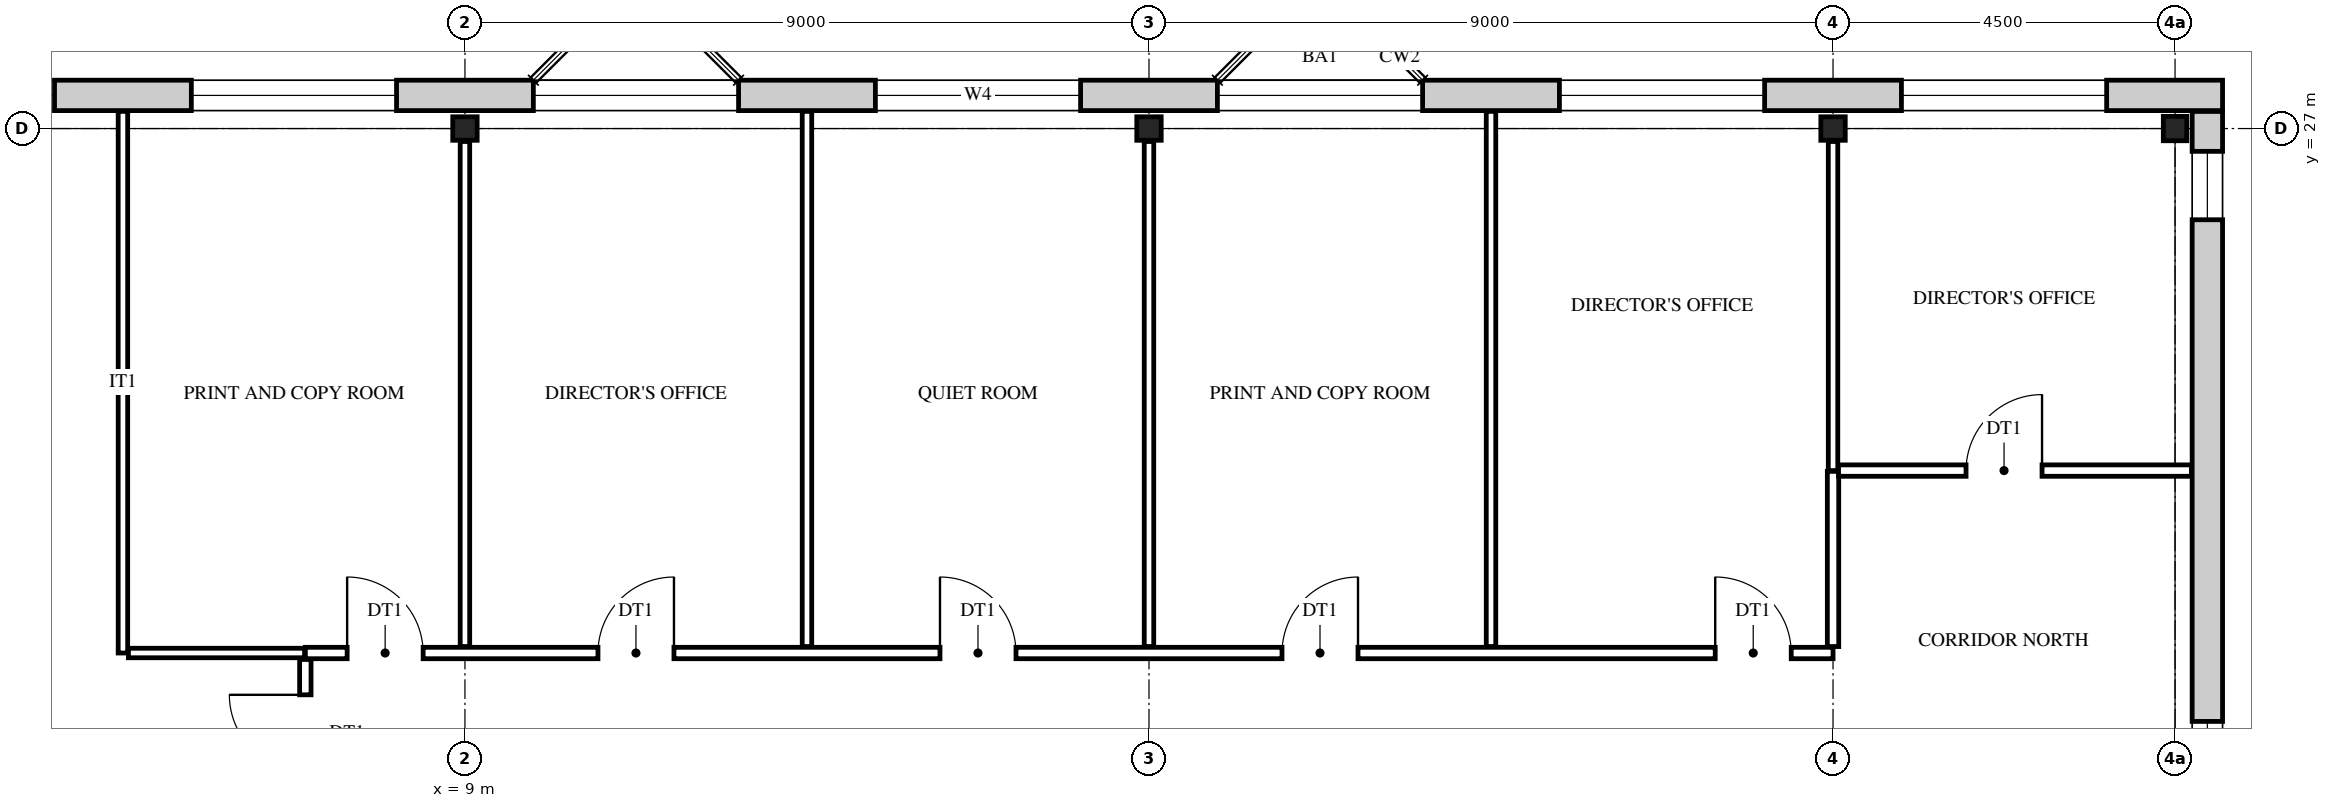
"""IFC4 building model, lengths in metres.
Left out: names, types, materials, properties, quantities, classifications, styles, units other than length and angle.
Written with IfcOpenShell. Run it as: python <this file> out.ifc"""

import sys

from ifc_helpers import new_model, si_unit, direction, frame, frame_2d, origin, origin_2d, place, context, subcontext, project, spatial, rectangle, i_section, extrude, element, fill, save


model = new_model("IFC4")
c1 = context("Model", 3, precision=1e-05, world=origin(), true_north=direction((0.0, 1.0)))
c2 = subcontext(c1, "Body", "Model", "MODEL_VIEW")
j1 = project(units=[si_unit("LENGTHUNIT", "METRE"), si_unit("PLANEANGLEUNIT", "RADIAN")], contexts=[c1])
p1 = place(None, origin())
s1 = spatial("IfcSite", under=j1, at=p1, CompositionType="ELEMENT")
p2 = place(p1, origin())
s2 = spatial("IfcBuilding", under=s1, at=p2, CompositionType="ELEMENT")
p3 = place(p2, frame((0.0, 0.0, 52.8)))
s3 = spatial("IfcBuildingStorey", under=s2, at=p3, CompositionType="ELEMENT", Elevation=52.8)
for number, where, z_axis, x_axis in (
    (1, (9.0, 27.0, 0.0), (0.0, 0.0, 1.0), (0.0, 1.0, 0.0)),
    (2, (18.0, 27.0, 0.0), (0.0, 0.0, 1.0), (0.0, 1.0, 0.0)),
    (3, (27.0, 27.0, 0.0), (0.0, 0.0, 1.0), (0.0, 1.0, 0.0)),
    (4, (31.5, 27.0, 0.0), (0.0, 0.0, 1.0), (1.0, 0.0, 0.0)),
):
    element("IfcColumn", number, at=place(p3, frame(where, z_axis=z_axis, x_axis=x_axis)), inside=s3, PredefinedType="COLUMN", context=c2, shape_type="SweptSolid", body=[
        extrude(i_section(OverallWidth=0.309, OverallDepth=0.321, WebThickness=0.014, FlangeThickness=0.022, FilletRadius=0.017, at=origin_2d()), origin(), (0.0, 0.0, 1.0), 4.2),
    ])
p4 = place(p3, frame((-0.625, 27.436, 0.0), z_axis=(0.0, 0.0, 1.0), x_axis=(1.0, 0.0, 0.0)))
e5 = element("IfcWall", 5, at=p4, inside=s3, PredefinedType="STANDARD", context=c2, shape_type="SweptSolid", body=[
    extrude(rectangle(XDim=32.75, YDim=0.4, at=frame_2d((16.375, 0.0))), origin(), (0.0, 0.0, 1.0), 4.2),
])
p5 = place(p4, frame((1.525, 0.0, 0.9)))
e6 = element("IfcOpeningElement", 6, at=p5, cuts=e5, PredefinedType="OPENING", context=c2, shape_type="SweptSolid", body=[
    extrude(rectangle(XDim=2.7, YDim=2.5, at=frame_2d((1.35, 1.25))), frame((0.0, 0.21, 0.0), z_axis=(0.0, -1.0, 0.0), x_axis=(1.0, 0.0, 0.0)), (0.0, 0.0, 1.0), 0.42),
])
p6 = place(p4, frame((6.025, 0.0, 0.9)))
e7 = element("IfcOpeningElement", 7, at=p6, cuts=e5, PredefinedType="OPENING", context=c2, shape_type="SweptSolid", body=[
    extrude(rectangle(XDim=2.7, YDim=2.5, at=frame_2d((1.35, 1.25))), frame((0.0, 0.21, 0.0), z_axis=(0.0, -1.0, 0.0), x_axis=(1.0, 0.0, 0.0)), (0.0, 0.0, 1.0), 0.42),
])
p7 = place(p4, frame((10.525, 0.0, 0.9)))
e8 = element("IfcOpeningElement", 8, at=p7, cuts=e5, PredefinedType="OPENING", context=c2, shape_type="SweptSolid", body=[
    extrude(rectangle(XDim=2.7, YDim=2.5, at=frame_2d((1.35, 1.25))), frame((0.0, 0.21, 0.0), z_axis=(0.0, -1.0, 0.0), x_axis=(1.0, 0.0, 0.0)), (0.0, 0.0, 1.0), 0.42),
])
p8 = place(p4, frame((15.025, 0.0, 0.9)))
e9 = element("IfcOpeningElement", 9, at=p8, cuts=e5, PredefinedType="OPENING", context=c2, shape_type="SweptSolid", body=[
    extrude(rectangle(XDim=2.7, YDim=2.5, at=frame_2d((1.35, 1.25))), frame((0.0, 0.21, 0.0), z_axis=(0.0, -1.0, 0.0), x_axis=(1.0, 0.0, 0.0)), (0.0, 0.0, 1.0), 0.42),
])
p9 = place(p4, frame((19.525, 0.0, 0.9)))
e10 = element("IfcOpeningElement", 10, at=p9, cuts=e5, PredefinedType="OPENING", context=c2, shape_type="SweptSolid", body=[
    extrude(rectangle(XDim=2.7, YDim=2.5, at=frame_2d((1.35, 1.25))), frame((0.0, 0.21, 0.0), z_axis=(0.0, -1.0, 0.0), x_axis=(1.0, 0.0, 0.0)), (0.0, 0.0, 1.0), 0.42),
])
p10 = place(p4, frame((24.025, 0.0, 0.9)))
e11 = element("IfcOpeningElement", 11, at=p10, cuts=e5, PredefinedType="OPENING", context=c2, shape_type="SweptSolid", body=[
    extrude(rectangle(XDim=2.7, YDim=2.5, at=frame_2d((1.35, 1.25))), frame((0.0, 0.21, 0.0), z_axis=(0.0, -1.0, 0.0), x_axis=(1.0, 0.0, 0.0)), (0.0, 0.0, 1.0), 0.42),
])
p11 = place(p4, frame((28.525, 0.0, 0.9)))
e12 = element("IfcOpeningElement", 12, at=p11, cuts=e5, PredefinedType="OPENING", context=c2, shape_type="SweptSolid", body=[
    extrude(rectangle(XDim=2.7, YDim=2.5, at=frame_2d((1.35, 1.25))), frame((0.0, 0.21, 0.0), z_axis=(0.0, -1.0, 0.0), x_axis=(1.0, 0.0, 0.0)), (0.0, 0.0, 1.0), 0.42),
])
p12 = place(p3, frame((31.925, 27.225, 0.0), z_axis=(0.0, 0.0, 1.0), x_axis=(0.0, -1.0, 0.0)))
e13 = element("IfcWall", 13, at=p12, inside=s3, PredefinedType="STANDARD", context=c2, shape_type="SweptSolid", body=[
    extrude(rectangle(XDim=27.45, YDim=0.4, at=frame_2d((13.725, 0.0))), origin(), (0.0, 0.0, 1.0), 4.2),
])
p13 = place(p12, frame((26.025, 0.0, 0.9)))
e14 = element("IfcOpeningElement", 14, at=p13, cuts=e13, PredefinedType="OPENING", context=c2, shape_type="SweptSolid", body=[
    extrude(rectangle(XDim=0.9, YDim=2.0, at=frame_2d((0.45, 1.0))), frame((0.0, 0.21, 0.0), z_axis=(0.0, -1.0, 0.0), x_axis=(1.0, 0.0, 0.0)), (0.0, 0.0, 1.0), 0.42),
])
p14 = place(p12, frame((18.525, 0.0, 0.9)))
e15 = element("IfcOpeningElement", 15, at=p14, cuts=e13, PredefinedType="OPENING", context=c2, shape_type="SweptSolid", body=[
    extrude(rectangle(XDim=0.9, YDim=2.0, at=frame_2d((0.45, 1.0))), frame((0.0, 0.21, 0.0), z_axis=(0.0, -1.0, 0.0), x_axis=(1.0, 0.0, 0.0)), (0.0, 0.0, 1.0), 0.42),
])
p15 = place(p12, frame((15.675, 0.0, 1.6)))
e16 = element("IfcOpeningElement", 16, at=p15, cuts=e13, PredefinedType="OPENING", context=c2, shape_type="SweptSolid", body=[
    extrude(rectangle(XDim=0.6, YDim=0.9, at=frame_2d((0.3, 0.45))), frame((0.0, 0.21, 0.0), z_axis=(0.0, -1.0, 0.0), x_axis=(1.0, 0.0, 0.0)), (0.0, 0.0, 1.0), 0.42),
])
p16 = place(p12, frame((11.175, 0.0, 1.6)))
e17 = element("IfcOpeningElement", 17, at=p16, cuts=e13, PredefinedType="OPENING", context=c2, shape_type="SweptSolid", body=[
    extrude(rectangle(XDim=0.6, YDim=0.9, at=frame_2d((0.3, 0.45))), frame((0.0, 0.21, 0.0), z_axis=(0.0, -1.0, 0.0), x_axis=(1.0, 0.0, 0.0)), (0.0, 0.0, 1.0), 0.42),
])
p17 = place(p12, frame((8.025, 0.0, 0.9)))
e18 = element("IfcOpeningElement", 18, at=p17, cuts=e13, PredefinedType="OPENING", context=c2, shape_type="SweptSolid", body=[
    extrude(rectangle(XDim=0.9, YDim=2.0, at=frame_2d((0.45, 1.0))), frame((0.0, 0.21, 0.0), z_axis=(0.0, -1.0, 0.0), x_axis=(1.0, 0.0, 0.0)), (0.0, 0.0, 1.0), 0.42),
])
p18 = place(p12, frame((0.525, 0.0, 0.9)))
e19 = element("IfcOpeningElement", 19, at=p18, cuts=e13, PredefinedType="OPENING", context=c2, shape_type="SweptSolid", body=[
    extrude(rectangle(XDim=0.9, YDim=2.0, at=frame_2d((0.45, 1.0))), frame((0.0, 0.21, 0.0), z_axis=(0.0, -1.0, 0.0), x_axis=(1.0, 0.0, 0.0)), (0.0, 0.0, 1.0), 0.42),
])
p19 = place(p3, frame((4.5, 20.1, 0.0), z_axis=(0.0, 0.0, 1.0), x_axis=(0.0, 1.0, 0.0)))
e20 = element("IfcWall", 20, at=p19, inside=s3, PredefinedType="PARTITIONING", context=c2, shape_type="SweptSolid", body=[
    extrude(rectangle(XDim=7.126, YDim=0.125, at=frame_2d((3.563, 0.0))), origin(), (0.0, 0.0, 1.0), 3.542),
])
p20 = place(p3, frame((6.9, 6.985, 0.0), z_axis=(0.0, 0.0, 1.0), x_axis=(0.0, 1.0, 0.0)))
e21 = element("IfcWall", 21, at=p20, inside=s3, PredefinedType="PARTITIONING", context=c2, shape_type="SweptSolid", body=[
    extrude(rectangle(XDim=13.03, YDim=0.15, at=frame_2d((6.515, 0.0))), origin(), (0.0, 0.0, 1.0), 3.542),
])
p21 = place(p20, frame((11.565, 0.0, 0.0)))
e22 = element("IfcOpeningElement", 22, at=p21, cuts=e21, PredefinedType="OPENING", context=c2, shape_type="SweptSolid", body=[
    extrude(rectangle(XDim=1.0, YDim=2.1, at=frame_2d((0.5, 1.05))), frame((0.0, 0.085, 0.0), z_axis=(0.0, -1.0, 0.0), x_axis=(1.0, 0.0, 0.0)), (0.0, 0.0, 1.0), 0.17),
])
p22 = place(p20, frame((3.765, 0.0, 0.0)))
e23 = element("IfcOpeningElement", 23, at=p22, cuts=e21, PredefinedType="OPENING", context=c2, shape_type="SweptSolid", body=[
    extrude(rectangle(XDim=1.0, YDim=2.1, at=frame_2d((0.5, 1.05))), frame((0.0, 0.085, 0.0), z_axis=(0.0, -1.0, 0.0), x_axis=(1.0, 0.0, 0.0)), (0.0, 0.0, 1.0), 0.17),
])
p23 = place(p20, frame((8.265, 0.0, 0.0)))
e24 = element("IfcOpeningElement", 24, at=p23, cuts=e21, PredefinedType="OPENING", context=c2, shape_type="SweptSolid", body=[
    extrude(rectangle(XDim=1.0, YDim=2.1, at=frame_2d((0.5, 1.05))), frame((0.0, 0.085, 0.0), z_axis=(0.0, -1.0, 0.0), x_axis=(1.0, 0.0, 0.0)), (0.0, 0.0, 1.0), 0.17),
])
p24 = place(p3, frame((9.0, 20.185, 0.0), z_axis=(0.0, 0.0, 1.0), x_axis=(0.0, 1.0, 0.0)))
e25 = element("IfcWall", 25, at=p24, inside=s3, PredefinedType="PARTITIONING", context=c2, shape_type="SweptSolid", body=[
    extrude(rectangle(XDim=6.645, YDim=0.125, at=frame_2d((3.322, 0.0))), origin(), (0.0, 0.0, 1.0), 3.542),
])
p25 = place(p3, frame((13.5, 20.185, 0.0), z_axis=(0.0, 0.0, 1.0), x_axis=(0.0, 1.0, 0.0)))
e26 = element("IfcWall", 26, at=p25, inside=s3, PredefinedType="PARTITIONING", context=c2, shape_type="SweptSolid", body=[
    extrude(rectangle(XDim=7.041, YDim=0.125, at=frame_2d((3.521, 0.0))), origin(), (0.0, 0.0, 1.0), 3.542),
])
p26 = place(p3, frame((18.0, 20.185, 0.0), z_axis=(0.0, 0.0, 1.0), x_axis=(0.0, 1.0, 0.0)))
e27 = element("IfcWall", 27, at=p26, inside=s3, PredefinedType="PARTITIONING", context=c2, shape_type="SweptSolid", body=[
    extrude(rectangle(XDim=6.645, YDim=0.125, at=frame_2d((3.322, 0.0))), origin(), (0.0, 0.0, 1.0), 3.542),
])
p27 = place(p3, frame((22.5, 20.185, 0.0), z_axis=(0.0, 0.0, 1.0), x_axis=(0.0, 1.0, 0.0)))
e28 = element("IfcWall", 28, at=p27, inside=s3, PredefinedType="PARTITIONING", context=c2, shape_type="SweptSolid", body=[
    extrude(rectangle(XDim=7.041, YDim=0.125, at=frame_2d((3.521, 0.0))), origin(), (0.0, 0.0, 1.0), 3.542),
])
p28 = place(p3, frame((27.0, 20.185, 0.0), z_axis=(0.0, 0.0, 1.0), x_axis=(0.0, 1.0, 0.0)))
e29 = element("IfcWall", 29, at=p28, inside=s3, PredefinedType="PARTITIONING", context=c2, shape_type="SweptSolid", body=[
    extrude(rectangle(XDim=2.305, YDim=0.15, at=frame_2d((1.152, 0.0))), origin(), (0.0, 0.0, 1.0), 3.542),
])
p29 = place(p3, frame((27.0, 22.5, 0.0), z_axis=(0.0, 0.0, 1.0), x_axis=(0.0, 1.0, 0.0)))
e30 = element("IfcWall", 30, at=p29, inside=s3, PredefinedType="PARTITIONING", context=c2, shape_type="SweptSolid", body=[
    extrude(rectangle(XDim=4.33, YDim=0.125, at=frame_2d((2.165, 0.0))), origin(), (0.0, 0.0, 1.0), 3.542),
])
p30 = place(p3, frame((4.573, 20.1, 0.0), z_axis=(0.0, 0.0, 1.0), x_axis=(1.0, 0.0, 0.0)))
e31 = element("IfcWall", 31, at=p30, inside=s3, PredefinedType="PARTITIONING", context=c2, shape_type="SweptSolid", body=[
    extrude(rectangle(XDim=2.317, YDim=0.125, at=frame_2d((1.159, 0.0))), origin(), (0.0, 0.0, 1.0), 3.542),
])
p31 = place(p3, frame((6.9, 20.1, 0.0), z_axis=(0.0, 0.0, 1.0), x_axis=(1.0, 0.0, 0.0)))
e32 = element("IfcWall", 32, at=p31, inside=s3, PredefinedType="PARTITIONING", context=c2, shape_type="SweptSolid", body=[
    extrude(rectangle(XDim=20.1, YDim=0.15, at=frame_2d((10.05, 0.0))), origin(), (0.0, 0.0, 1.0), 3.542),
])
p32 = place(p31, frame((0.55, 0.0, 0.0)))
e33 = element("IfcOpeningElement", 33, at=p32, cuts=e32, PredefinedType="OPENING", context=c2, shape_type="SweptSolid", body=[
    extrude(rectangle(XDim=1.0, YDim=2.1, at=frame_2d((0.5, 1.05))), frame((0.0, 0.085, 0.0), z_axis=(0.0, -1.0, 0.0), x_axis=(1.0, 0.0, 0.0)), (0.0, 0.0, 1.0), 0.17),
])
p33 = place(p31, frame((3.85, 0.0, 0.0)))
e34 = element("IfcOpeningElement", 34, at=p33, cuts=e32, PredefinedType="OPENING", context=c2, shape_type="SweptSolid", body=[
    extrude(rectangle(XDim=1.0, YDim=2.1, at=frame_2d((0.5, 1.05))), frame((0.0, 0.085, 0.0), z_axis=(0.0, -1.0, 0.0), x_axis=(1.0, 0.0, 0.0)), (0.0, 0.0, 1.0), 0.17),
])
p34 = place(p31, frame((8.35, 0.0, 0.0)))
e35 = element("IfcOpeningElement", 35, at=p34, cuts=e32, PredefinedType="OPENING", context=c2, shape_type="SweptSolid", body=[
    extrude(rectangle(XDim=1.0, YDim=2.1, at=frame_2d((0.5, 1.05))), frame((0.0, 0.085, 0.0), z_axis=(0.0, -1.0, 0.0), x_axis=(1.0, 0.0, 0.0)), (0.0, 0.0, 1.0), 0.17),
])
p35 = place(p31, frame((12.85, 0.0, 0.0)))
e36 = element("IfcOpeningElement", 36, at=p35, cuts=e32, PredefinedType="OPENING", context=c2, shape_type="SweptSolid", body=[
    extrude(rectangle(XDim=1.0, YDim=2.1, at=frame_2d((0.5, 1.05))), frame((0.0, 0.085, 0.0), z_axis=(0.0, -1.0, 0.0), x_axis=(1.0, 0.0, 0.0)), (0.0, 0.0, 1.0), 0.17),
])
p36 = place(p31, frame((18.55, 0.0, 0.0)))
e37 = element("IfcOpeningElement", 37, at=p36, cuts=e32, PredefinedType="OPENING", context=c2, shape_type="SweptSolid", body=[
    extrude(rectangle(XDim=1.0, YDim=2.1, at=frame_2d((0.5, 1.05))), frame((0.0, 0.085, 0.0), z_axis=(0.0, -1.0, 0.0), x_axis=(1.0, 0.0, 0.0)), (0.0, 0.0, 1.0), 0.17),
])
p37 = place(p3, frame((27.073, 22.5, 0.0), z_axis=(0.0, 0.0, 1.0), x_axis=(1.0, 0.0, 0.0)))
e38 = element("IfcWall", 38, at=p37, inside=s3, PredefinedType="PARTITIONING", context=c2, shape_type="SweptSolid", body=[
    extrude(rectangle(XDim=4.643, YDim=0.15, at=frame_2d((2.321, 0.0))), origin(), (0.0, 0.0, 1.0), 3.542),
])
p38 = place(p37, frame((1.677, 0.0, 0.0)))
e39 = element("IfcOpeningElement", 39, at=p38, cuts=e38, PredefinedType="OPENING", context=c2, shape_type="SweptSolid", body=[
    extrude(rectangle(XDim=1.0, YDim=2.1, at=frame_2d((0.5, 1.05))), frame((0.0, 0.085, 0.0), z_axis=(0.0, -1.0, 0.0), x_axis=(1.0, 0.0, 0.0)), (0.0, 0.0, 1.0), 0.17),
])
p39 = place(p5, origin())
e40 = element("IfcWindow", 40, at=p39, inside=s3, PartitioningType="SINGLE_PANEL", PredefinedType="WINDOW", context=c2, shape_type="SweptSolid", body=[
    extrude(rectangle(XDim=2.7, YDim=2.5, at=frame_2d((1.35, 1.25))), frame((0.0, 0.03, 0.0), z_axis=(0.0, -1.0, 0.0), x_axis=(1.0, 0.0, 0.0)), (0.0, 0.0, 1.0), 0.06),
])
fill(e6, e40)
p40 = place(p6, origin())
e41 = element("IfcWindow", 41, at=p40, inside=s3, PartitioningType="SINGLE_PANEL", PredefinedType="WINDOW", context=c2, shape_type="SweptSolid", body=[
    extrude(rectangle(XDim=2.7, YDim=2.5, at=frame_2d((1.35, 1.25))), frame((0.0, 0.03, 0.0), z_axis=(0.0, -1.0, 0.0), x_axis=(1.0, 0.0, 0.0)), (0.0, 0.0, 1.0), 0.06),
])
fill(e7, e41)
p41 = place(p7, origin())
e42 = element("IfcWindow", 42, at=p41, inside=s3, PartitioningType="SINGLE_PANEL", PredefinedType="WINDOW", context=c2, shape_type="SweptSolid", body=[
    extrude(rectangle(XDim=2.7, YDim=2.5, at=frame_2d((1.35, 1.25))), frame((0.0, 0.03, 0.0), z_axis=(0.0, -1.0, 0.0), x_axis=(1.0, 0.0, 0.0)), (0.0, 0.0, 1.0), 0.06),
])
fill(e8, e42)
p42 = place(p8, origin())
e43 = element("IfcWindow", 43, at=p42, inside=s3, PartitioningType="SINGLE_PANEL", PredefinedType="WINDOW", context=c2, shape_type="SweptSolid", body=[
    extrude(rectangle(XDim=2.7, YDim=2.5, at=frame_2d((1.35, 1.25))), frame((0.0, 0.03, 0.0), z_axis=(0.0, -1.0, 0.0), x_axis=(1.0, 0.0, 0.0)), (0.0, 0.0, 1.0), 0.06),
])
fill(e9, e43)
p43 = place(p9, origin())
e44 = element("IfcWindow", 44, at=p43, inside=s3, PartitioningType="SINGLE_PANEL", PredefinedType="WINDOW", context=c2, shape_type="SweptSolid", body=[
    extrude(rectangle(XDim=2.7, YDim=2.5, at=frame_2d((1.35, 1.25))), frame((0.0, 0.03, 0.0), z_axis=(0.0, -1.0, 0.0), x_axis=(1.0, 0.0, 0.0)), (0.0, 0.0, 1.0), 0.06),
])
fill(e10, e44)
p44 = place(p10, origin())
e45 = element("IfcWindow", 45, at=p44, inside=s3, PartitioningType="SINGLE_PANEL", PredefinedType="WINDOW", context=c2, shape_type="SweptSolid", body=[
    extrude(rectangle(XDim=2.7, YDim=2.5, at=frame_2d((1.35, 1.25))), frame((0.0, 0.03, 0.0), z_axis=(0.0, -1.0, 0.0), x_axis=(1.0, 0.0, 0.0)), (0.0, 0.0, 1.0), 0.06),
])
fill(e11, e45)
p45 = place(p11, origin())
e46 = element("IfcWindow", 46, at=p45, inside=s3, PartitioningType="SINGLE_PANEL", PredefinedType="WINDOW", context=c2, shape_type="SweptSolid", body=[
    extrude(rectangle(XDim=2.7, YDim=2.5, at=frame_2d((1.35, 1.25))), frame((0.0, 0.03, 0.0), z_axis=(0.0, -1.0, 0.0), x_axis=(1.0, 0.0, 0.0)), (0.0, 0.0, 1.0), 0.06),
])
fill(e12, e46)
p46 = place(p17, origin())
e47 = element("IfcWindow", 47, at=p46, inside=s3, PartitioningType="SINGLE_PANEL", PredefinedType="WINDOW", context=c2, shape_type="SweptSolid", body=[
    extrude(rectangle(XDim=0.9, YDim=2.0, at=frame_2d((0.45, 1.0))), frame((0.0, 0.03, 0.0), z_axis=(0.0, -1.0, 0.0), x_axis=(1.0, 0.0, 0.0)), (0.0, 0.0, 1.0), 0.06),
])
fill(e18, e47)
p47 = place(p18, origin())
e48 = element("IfcWindow", 48, at=p47, inside=s3, PartitioningType="SINGLE_PANEL", PredefinedType="WINDOW", context=c2, shape_type="SweptSolid", body=[
    extrude(rectangle(XDim=0.9, YDim=2.0, at=frame_2d((0.45, 1.0))), frame((0.0, 0.03, 0.0), z_axis=(0.0, -1.0, 0.0), x_axis=(1.0, 0.0, 0.0)), (0.0, 0.0, 1.0), 0.06),
])
fill(e19, e48)
p48 = place(p21, origin())
e49 = element("IfcDoor", 49, at=p48, inside=s3, OperationType="SINGLE_SWING_RIGHT", PredefinedType="DOOR", context=c2, shape_type="SweptSolid", body=[
    extrude(rectangle(XDim=1.0, YDim=2.1, at=frame_2d((0.5, 1.05))), frame((0.0, 0.025, 0.0), z_axis=(0.0, -1.0, 0.0), x_axis=(1.0, 0.0, 0.0)), (0.0, 0.0, 1.0), 0.05),
])
fill(e22, e49)
p49 = place(p32, origin())
e50 = element("IfcDoor", 50, at=p49, inside=s3, OperationType="SINGLE_SWING_LEFT", PredefinedType="DOOR", context=c2, shape_type="SweptSolid", body=[
    extrude(rectangle(XDim=1.0, YDim=2.1, at=frame_2d((0.5, 1.05))), frame((0.0, 0.025, 0.0), z_axis=(0.0, -1.0, 0.0), x_axis=(1.0, 0.0, 0.0)), (0.0, 0.0, 1.0), 0.05),
])
fill(e33, e50)
p50 = place(p33, origin())
e51 = element("IfcDoor", 51, at=p50, inside=s3, OperationType="SINGLE_SWING_RIGHT", PredefinedType="DOOR", context=c2, shape_type="SweptSolid", body=[
    extrude(rectangle(XDim=1.0, YDim=2.1, at=frame_2d((0.5, 1.05))), frame((0.0, 0.025, 0.0), z_axis=(0.0, -1.0, 0.0), x_axis=(1.0, 0.0, 0.0)), (0.0, 0.0, 1.0), 0.05),
])
fill(e34, e51)
p51 = place(p34, origin())
e52 = element("IfcDoor", 52, at=p51, inside=s3, OperationType="SINGLE_SWING_LEFT", PredefinedType="DOOR", context=c2, shape_type="SweptSolid", body=[
    extrude(rectangle(XDim=1.0, YDim=2.1, at=frame_2d((0.5, 1.05))), frame((0.0, 0.025, 0.0), z_axis=(0.0, -1.0, 0.0), x_axis=(1.0, 0.0, 0.0)), (0.0, 0.0, 1.0), 0.05),
])
fill(e35, e52)
p52 = place(p35, origin())
e53 = element("IfcDoor", 53, at=p52, inside=s3, OperationType="SINGLE_SWING_RIGHT", PredefinedType="DOOR", context=c2, shape_type="SweptSolid", body=[
    extrude(rectangle(XDim=1.0, YDim=2.1, at=frame_2d((0.5, 1.05))), frame((0.0, 0.025, 0.0), z_axis=(0.0, -1.0, 0.0), x_axis=(1.0, 0.0, 0.0)), (0.0, 0.0, 1.0), 0.05),
])
fill(e36, e53)
p53 = place(p36, origin())
e54 = element("IfcDoor", 54, at=p53, inside=s3, OperationType="SINGLE_SWING_LEFT", PredefinedType="DOOR", context=c2, shape_type="SweptSolid", body=[
    extrude(rectangle(XDim=1.0, YDim=2.1, at=frame_2d((0.5, 1.05))), frame((0.0, 0.025, 0.0), z_axis=(0.0, -1.0, 0.0), x_axis=(1.0, 0.0, 0.0)), (0.0, 0.0, 1.0), 0.05),
])
fill(e37, e54)
p54 = place(p38, origin())
e55 = element("IfcDoor", 55, at=p54, inside=s3, OperationType="SINGLE_SWING_RIGHT", PredefinedType="DOOR", context=c2, shape_type="SweptSolid", body=[
    extrude(rectangle(XDim=1.0, YDim=2.1, at=frame_2d((0.5, 1.05))), frame((0.0, 0.025, 0.0), z_axis=(0.0, -1.0, 0.0), x_axis=(1.0, 0.0, 0.0)), (0.0, 0.0, 1.0), 0.05),
])
fill(e39, e55)
save(model, sys.argv[1])
